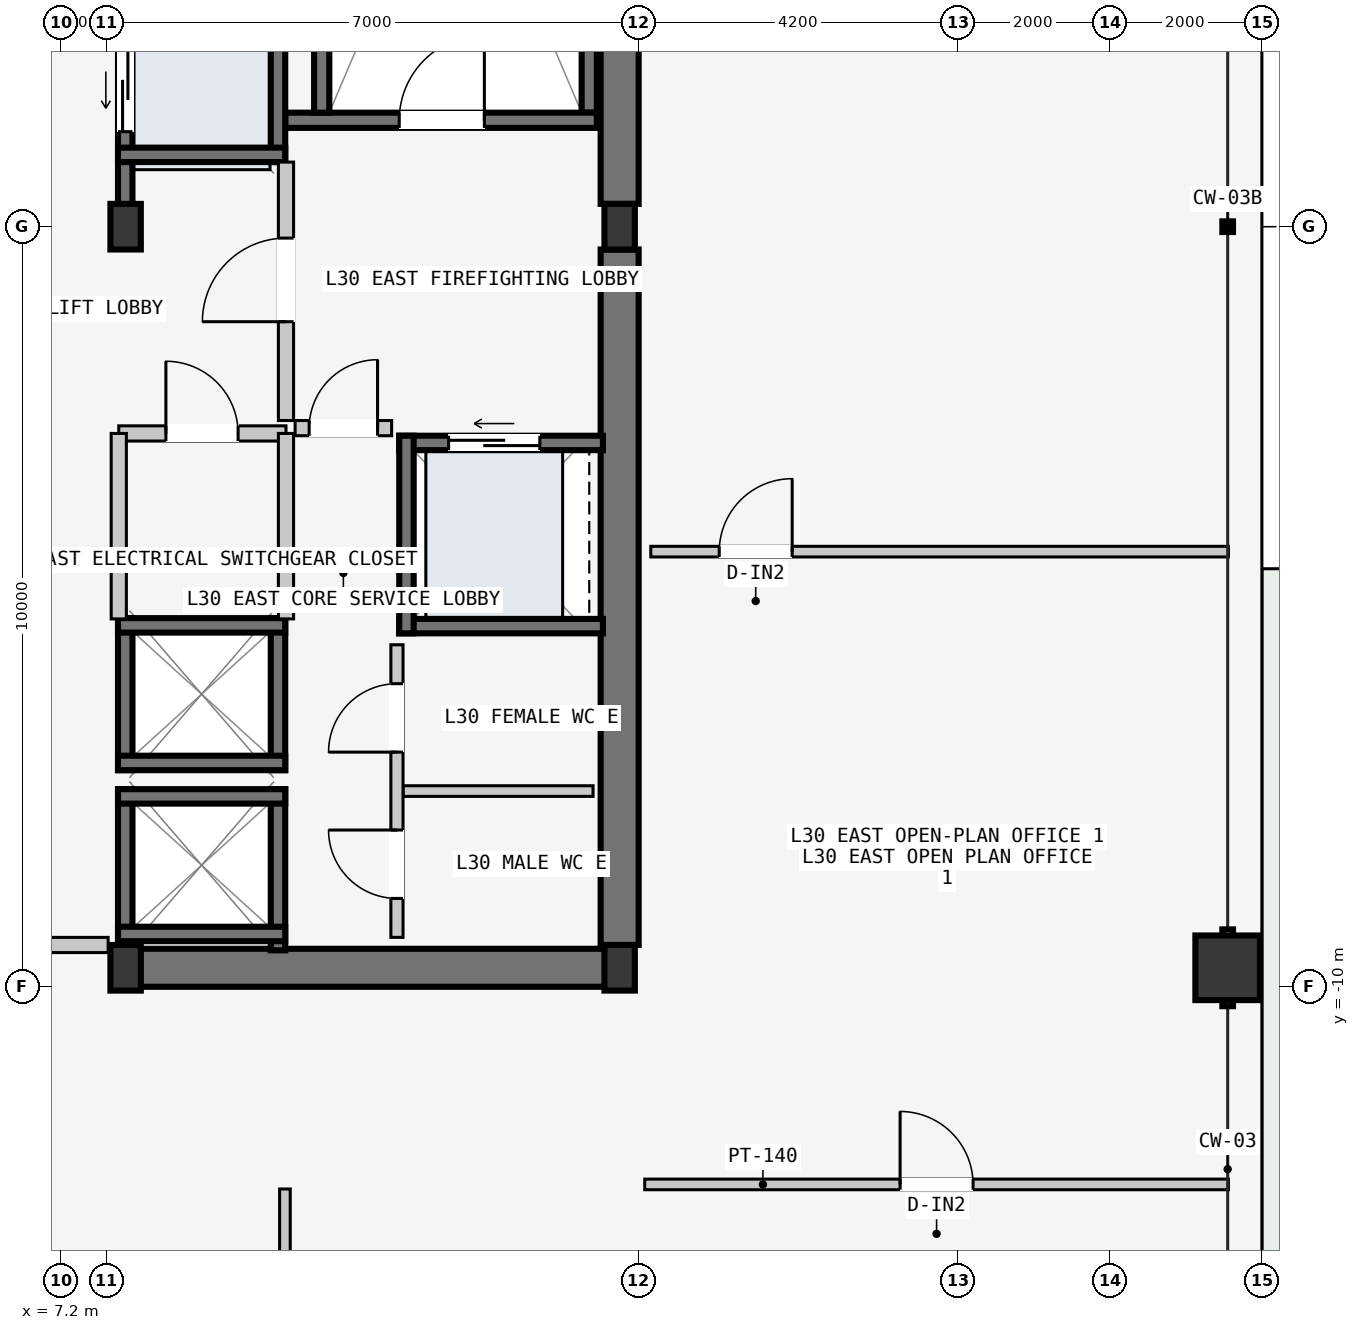
"""IFC4 building model, lengths in metres.
Left out: names, types, materials, properties, quantities, classifications, styles, units other than length and angle.
Written with IfcOpenShell. Run it as: python <this file> out.ifc"""

import sys

from ifc_helpers import new_model, si_unit, direction, frame, frame_2d, origin, origin_2d, place, context, subcontext, project, spatial, rectangle, hollow_rectangle, i_section, extrude, element, fill, save


model = new_model("IFC4")
c1 = context("Model", 3, precision=1e-05, world=origin(), true_north=direction((0.0, 1.0)))
c2 = subcontext(c1, "Body", "Model", "MODEL_VIEW")
j1 = project(units=[si_unit("LENGTHUNIT", "METRE"), si_unit("PLANEANGLEUNIT", "RADIAN")], contexts=[c1])
p1 = place(None, origin())
s1 = spatial("IfcSite", under=j1, at=p1, CompositionType="ELEMENT")
p2 = place(p1, origin())
s2 = spatial("IfcBuilding", under=s1, at=p2, CompositionType="ELEMENT")
p3 = place(p2, frame((0.0, 0.0, 117.0)))
s3 = spatial("IfcBuildingStorey", under=s2, at=p3, CompositionType="ELEMENT", Elevation=117.0)
p4 = place(p3, frame((8.07, -9.75, -0.2), z_axis=(0.0, 0.0, 1.0), x_axis=(1.0, 0.0, 0.0)))
e1 = element("IfcWall", 1, at=p4, inside=s3, PredefinedType="SHEAR", context=c2, shape_type="SweptSolid", body=[
    extrude(rectangle(XDim=6.46, YDim=0.5, at=frame_2d((3.23, 0.0))), origin(), (0.0, 0.0, 1.0), 3.6),
])
for number, where, z_axis, x_axis in (
    (2, (14.55, -9.45, -0.2), (0.0, 0.0, 1.0), (0.0, 1.0, 0.0)),
    (3, (14.55, 0.3, -0.2), (0.0, 0.0, 1.0), (0.0, 1.0, 0.0)),
):
    element("IfcWall", number, at=place(p3, frame(where, z_axis=z_axis, x_axis=x_axis)), inside=s3, PredefinedType="SHEAR", context=c2, shape_type="SweptSolid", body=[
        extrude(rectangle(XDim=9.15, YDim=0.5, at=frame_2d((4.575, 0.0))), origin(), (0.0, 0.0, 1.0), 3.6),
    ])
p5 = place(p3, frame((14.15, 1.5, -0.2), z_axis=(0.0, 0.0, 1.0), x_axis=(0.0, 1.0, 0.0)))
e4 = element("IfcWall", 4, at=p5, inside=s3, PredefinedType="SOLIDWALL", context=c2, shape_type="SweptSolid", body=[
    extrude(rectangle(XDim=7.8, YDim=0.2, at=frame_2d((3.9, 0.0))), origin(), (0.0, 0.0, 1.0), 3.6),
])
p6 = place(p3, frame((10.15, 1.4, -0.2), z_axis=(0.0, 0.0, 1.0), x_axis=(1.0, 0.0, 0.0)))
e5 = element("IfcWall", 5, at=p6, inside=s3, PredefinedType="SOLIDWALL", context=c2, shape_type="SweptSolid", body=[
    extrude(rectangle(XDim=4.1, YDim=0.2, at=frame_2d((2.05, 0.0))), origin(), (0.0, 0.0, 1.0), 3.6),
])
p7 = place(p6, frame((1.5, 0.0, 0.2)))
e6 = element("IfcOpeningElement", 6, at=p7, cuts=e5, PredefinedType="OPENING", context=c2, shape_type="SweptSolid", body=[
    extrude(rectangle(XDim=1.12, YDim=2.18, at=frame_2d((0.56, 1.09))), frame((0.0, 0.11, 0.0), z_axis=(0.0, -1.0, 0.0), x_axis=(1.0, 0.0, 0.0)), (0.0, 0.0, 1.0), 0.22),
])
p8 = place(p3, frame((10.63, 1.5, -0.2), z_axis=(0.0, 0.0, 1.0), x_axis=(0.0, 1.0, 0.0)))
e7 = element("IfcWall", 7, at=p8, inside=s3, PredefinedType="SOLIDWALL", context=c2, shape_type="SweptSolid", body=[
    extrude(rectangle(XDim=7.8, YDim=0.2, at=frame_2d((3.9, 0.0))), origin(), (0.0, 0.0, 1.0), 3.6),
])
for number, where, z_axis, x_axis in (
    (8, (8.05, -9.75, 0.0), (0.0, 0.0, 1.0), (1.0, 0.0, 0.0)),
    (9, (8.05, 0.0, 0.0), (0.0, 0.0, 1.0), (1.0, 0.0, 0.0)),
    (10, (14.55, -9.75, 0.0), (0.0, 0.0, 1.0), (1.0, 0.0, 0.0)),
    (11, (14.55, 0.0, 0.0), (0.0, 0.0, 1.0), (1.0, 0.0, 0.0)),
):
    element("IfcColumn", number, at=place(p3, frame(where, z_axis=z_axis, x_axis=x_axis)), inside=s3, PredefinedType="COLUMN", context=c2, shape_type="SweptSolid", body=[
        extrude(i_section(OverallWidth=0.4, OverallDepth=0.6, WebThickness=0.022, FlangeThickness=0.036, at=origin_2d()), origin(), (0.0, 0.0, 1.0), 3.6),
    ])
p9 = place(p3, frame((22.55, -9.75, 0.0), z_axis=(0.0, 0.0, 1.0), x_axis=(0.0, 1.0, 0.0)))
e12 = element("IfcColumn", 12, at=p9, inside=s3, PredefinedType="COLUMN", context=c2, shape_type="SweptSolid", body=[
    extrude(hollow_rectangle(XDim=0.85, YDim=0.85, WallThickness=0.04, at=origin_2d()), origin(), (0.0, 0.0, 1.0), 3.6),
])
p10 = place(p3, frame((8.045, 0.21, -0.2), z_axis=(0.0, 0.0, 1.0), x_axis=(0.0, 1.0, 0.0)))
e13 = element("IfcWall", 13, at=p10, inside=s3, PredefinedType="SOLIDWALL", context=c2, shape_type="SweptSolid", body=[
    extrude(rectangle(XDim=2.54, YDim=0.19, at=frame_2d((1.27, 0.0))), origin(), (0.0, 0.0, 1.0), 3.6),
])
p11 = place(p10, frame((1.04, 0.0, 0.2)))
e14 = element("IfcOpeningElement", 14, at=p11, cuts=e13, PredefinedType="OPENING", context=c2, shape_type="SweptSolid", body=[
    extrude(rectangle(XDim=1.1, YDim=2.2, at=frame_2d((0.55, 1.1))), frame((0.0, 0.105, 0.0), z_axis=(0.0, -1.0, 0.0), x_axis=(1.0, 0.0, 0.0)), (0.0, 0.0, 1.0), 0.21),
])
p12 = place(p3, frame((10.055, 0.85, -0.2), z_axis=(0.0, 0.0, 1.0), x_axis=(0.0, 1.0, 0.0)))
e15 = element("IfcWall", 15, at=p12, inside=s3, PredefinedType="SOLIDWALL", context=c2, shape_type="SweptSolid", body=[
    extrude(rectangle(XDim=1.9, YDim=0.19, at=frame_2d((0.95, 0.0))), origin(), (0.0, 0.0, 1.0), 3.6),
])
p13 = place(p3, frame((7.95, 0.945, -0.2), z_axis=(0.0, 0.0, 1.0), x_axis=(1.0, 0.0, 0.0)))
e16 = element("IfcWall", 16, at=p13, inside=s3, PredefinedType="SOLIDWALL", context=c2, shape_type="SweptSolid", body=[
    extrude(rectangle(XDim=2.2, YDim=0.19, at=frame_2d((1.1, 0.0))), origin(), (0.0, 0.0, 1.0), 3.6),
])
for number, where, z_axis, x_axis in (
    (17, (8.045, -9.52, -0.2), (0.0, 0.0, 1.0), (0.0, 1.0, 0.0)),
    (18, (10.055, -9.52, -0.2), (0.0, 0.0, 1.0), (0.0, 1.0, 0.0)),
):
    element("IfcWall", number, at=place(p3, frame(where, z_axis=z_axis, x_axis=x_axis)), inside=s3, PredefinedType="SOLIDWALL", context=c2, shape_type="SweptSolid", body=[
        extrude(rectangle(XDim=2.12, YDim=0.19, at=frame_2d((1.06, 0.0))), origin(), (0.0, 0.0, 1.0), 3.6),
    ])
for number, where, z_axis, x_axis in (
    (19, (7.95, -7.495, -0.2), (0.0, 0.0, 1.0), (1.0, 0.0, 0.0)),
    (20, (7.95, -9.305, -0.2), (0.0, 0.0, 1.0), (1.0, 0.0, 0.0)),
):
    element("IfcWall", number, at=place(p3, frame(where, z_axis=z_axis, x_axis=x_axis)), inside=s3, PredefinedType="SOLIDWALL", context=c2, shape_type="SweptSolid", body=[
        extrude(rectangle(XDim=2.2, YDim=0.19, at=frame_2d((1.1, 0.0))), origin(), (0.0, 0.0, 1.0), 3.6),
    ])
for number, where, z_axis, x_axis in (
    (21, (8.045, -7.15, -0.2), (0.0, 0.0, 1.0), (0.0, 1.0, 0.0)),
    (22, (10.055, -7.15, -0.2), (0.0, 0.0, 1.0), (0.0, 1.0, 0.0)),
):
    element("IfcWall", number, at=place(p3, frame(where, z_axis=z_axis, x_axis=x_axis)), inside=s3, PredefinedType="SOLIDWALL", context=c2, shape_type="SweptSolid", body=[
        extrude(rectangle(XDim=2.0, YDim=0.19, at=frame_2d((1.0, 0.0))), origin(), (0.0, 0.0, 1.0), 3.6),
    ])
for number, where, z_axis, x_axis in (
    (23, (7.95, -5.245, -0.2), (0.0, 0.0, 1.0), (1.0, 0.0, 0.0)),
    (24, (7.95, -7.055, -0.2), (0.0, 0.0, 1.0), (1.0, 0.0, 0.0)),
):
    element("IfcWall", number, at=place(p3, frame(where, z_axis=z_axis, x_axis=x_axis)), inside=s3, PredefinedType="SOLIDWALL", context=c2, shape_type="SweptSolid", body=[
        extrude(rectangle(XDim=2.2, YDim=0.19, at=frame_2d((1.1, 0.0))), origin(), (0.0, 0.0, 1.0), 3.6),
    ])
p14 = place(p3, frame((11.65, -2.845, -0.2), z_axis=(0.0, 0.0, 1.0), x_axis=(1.0, 0.0, 0.0)))
e25 = element("IfcWall", 25, at=p14, inside=s3, PredefinedType="SOLIDWALL", context=c2, shape_type="SweptSolid", body=[
    extrude(rectangle(XDim=2.68, YDim=0.19, at=frame_2d((1.34, 0.0))), origin(), (0.0, 0.0, 1.0), 3.6),
])
p15 = place(p14, frame((0.65, 0.0, 0.2)))
e26 = element("IfcOpeningElement", 26, at=p15, cuts=e25, PredefinedType="OPENING", context=c2, shape_type="SweptSolid", body=[
    extrude(rectangle(XDim=1.2, YDim=2.2, at=frame_2d((0.6, 1.1))), frame((0.0, 0.105, 0.0), z_axis=(0.0, -1.0, 0.0), x_axis=(1.0, 0.0, 0.0)), (0.0, 0.0, 1.0), 0.21),
])
p16 = place(p3, frame((11.65, -5.255, -0.2), z_axis=(0.0, 0.0, 1.0), x_axis=(1.0, 0.0, 0.0)))
e27 = element("IfcWall", 27, at=p16, inside=s3, PredefinedType="SOLIDWALL", context=c2, shape_type="SweptSolid", body=[
    extrude(rectangle(XDim=2.68, YDim=0.19, at=frame_2d((1.34, 0.0))), origin(), (0.0, 0.0, 1.0), 3.6),
])
p17 = place(p3, frame((11.745, -5.35, -0.2), z_axis=(0.0, 0.0, 1.0), x_axis=(0.0, 1.0, 0.0)))
e28 = element("IfcWall", 28, at=p17, inside=s3, PredefinedType="SOLIDWALL", context=c2, shape_type="SweptSolid", body=[
    extrude(rectangle(XDim=2.6, YDim=0.19, at=frame_2d((1.3, 0.0))), origin(), (0.0, 0.0, 1.0), 3.6),
])
p18 = place(p3, frame((6.02, -9.45, 0.0), z_axis=(0.0, 0.0, 1.0), x_axis=(1.0, 0.0, 0.0)))
e29 = element("IfcWall", 29, at=p18, inside=s3, PredefinedType="PARTITIONING", context=c2, shape_type="SweptSolid", body=[
    extrude(rectangle(XDim=1.8, YDim=0.2, at=frame_2d((0.9, 0.0))), origin(), (0.0, 0.0, 1.0), 3.4),
])
p19 = place(p3, frame((10.16, -2.55, 0.0), z_axis=(0.0, 0.0, 1.0), x_axis=(0.0, 1.0, 0.0)))
e30 = element("IfcWall", 30, at=p19, inside=s3, PredefinedType="PARTITIONING", context=c2, shape_type="SweptSolid", body=[
    extrude(rectangle(XDim=3.4, YDim=0.2, at=frame_2d((1.7, 0.0))), origin(), (0.0, 0.0, 1.0), 3.4),
])
p20 = place(p19, frame((1.3, 0.0, 0.0)))
e31 = element("IfcOpeningElement", 31, at=p20, cuts=e30, PredefinedType="OPENING", context=c2, shape_type="SweptSolid", body=[
    extrude(rectangle(XDim=1.1, YDim=2.15, at=frame_2d((0.55, 1.075))), frame((0.0, 0.11, 0.0), z_axis=(0.0, -1.0, 0.0), x_axis=(1.0, 0.0, 0.0)), (0.0, 0.0, 1.0), 0.22),
])
p21 = place(p3, frame((10.28, -2.65, 0.0), z_axis=(0.0, 0.0, 1.0), x_axis=(1.0, 0.0, 0.0)))
e32 = element("IfcWall", 32, at=p21, inside=s3, PredefinedType="PARTITIONING", context=c2, shape_type="SweptSolid", body=[
    extrude(rectangle(XDim=1.27, YDim=0.2, at=frame_2d((0.635, 0.0))), origin(), (0.0, 0.0, 1.0), 3.4),
])
p22 = place(p21, frame((0.185, 0.0, 0.0)))
e33 = element("IfcOpeningElement", 33, at=p22, cuts=e32, PredefinedType="OPENING", context=c2, shape_type="SweptSolid", body=[
    extrude(rectangle(XDim=0.9, YDim=2.15, at=frame_2d((0.45, 1.075))), frame((0.0, 0.11, 0.0), z_axis=(0.0, -1.0, 0.0), x_axis=(1.0, 0.0, 0.0)), (0.0, 0.0, 1.0), 0.22),
])
p23 = place(p3, frame((7.96, -2.72, 0.0), z_axis=(0.0, 0.0, 1.0), x_axis=(1.0, 0.0, 0.0)))
e34 = element("IfcWall", 34, at=p23, inside=s3, PredefinedType="PARTITIONING", context=c2, shape_type="SweptSolid", body=[
    extrude(rectangle(XDim=2.2, YDim=0.2, at=frame_2d((1.1, 0.0))), origin(), (0.0, 0.0, 1.0), 3.4),
])
p24 = place(p23, frame((0.62, 0.0, 0.0)))
e35 = element("IfcOpeningElement", 35, at=p24, cuts=e34, PredefinedType="OPENING", context=c2, shape_type="SweptSolid", body=[
    extrude(rectangle(XDim=0.95, YDim=2.1, at=frame_2d((0.475, 1.05))), frame((0.0, 0.11, 0.0), z_axis=(0.0, -1.0, 0.0), x_axis=(1.0, 0.0, 0.0)), (0.0, 0.0, 1.0), 0.22),
])
for number, where, z_axis, x_axis in (
    (36, (7.96, -5.16, 0.0), (0.0, 0.0, 1.0), (0.0, 1.0, 0.0)),
    (37, (10.16, -5.16, 0.0), (0.0, 0.0, 1.0), (0.0, 1.0, 0.0)),
):
    element("IfcWall", number, at=place(p3, frame(where, z_axis=z_axis, x_axis=x_axis)), inside=s3, PredefinedType="PARTITIONING", context=c2, shape_type="SweptSolid", body=[
        extrude(rectangle(XDim=2.44, YDim=0.2, at=frame_2d((1.22, 0.0))), origin(), (0.0, 0.0, 1.0), 3.4),
    ])
p25 = place(p3, frame((11.7, -7.425, 0.0), z_axis=(0.0, 0.0, 1.0), x_axis=(1.0, 0.0, 0.0)))
e38 = element("IfcWall", 38, at=p25, inside=s3, PredefinedType="PARTITIONING", context=c2, shape_type="SweptSolid", body=[
    extrude(rectangle(XDim=2.5, YDim=0.14, at=frame_2d((1.25, 0.0))), origin(), (0.0, 0.0, 1.0), 3.4),
])
p26 = place(p3, frame((11.62, -9.35, 0.0), z_axis=(0.0, 0.0, 1.0), x_axis=(0.0, 1.0, 0.0)))
e39 = element("IfcWall", 39, at=p26, inside=s3, PredefinedType="PARTITIONING", context=c2, shape_type="SweptSolid", body=[
    extrude(rectangle(XDim=3.85, YDim=0.16, at=frame_2d((1.925, 0.0))), origin(), (0.0, 0.0, 1.0), 3.4),
])
p27 = place(p26, frame((0.512, 0.0, 0.0)))
e40 = element("IfcOpeningElement", 40, at=p27, cuts=e39, PredefinedType="OPENING", context=c2, shape_type="SweptSolid", body=[
    extrude(rectangle(XDim=0.9, YDim=2.15, at=frame_2d((0.45, 1.075))), frame((0.0, 0.09, 0.0), z_axis=(0.0, -1.0, 0.0), x_axis=(1.0, 0.0, 0.0)), (0.0, 0.0, 1.0), 0.18),
])
p28 = place(p26, frame((2.438, 0.0, 0.0)))
e41 = element("IfcOpeningElement", 41, at=p28, cuts=e39, PredefinedType="OPENING", context=c2, shape_type="SweptSolid", body=[
    extrude(rectangle(XDim=0.9, YDim=2.15, at=frame_2d((0.45, 1.075))), frame((0.0, 0.09, 0.0), z_axis=(0.0, -1.0, 0.0), x_axis=(1.0, 0.0, 0.0)), (0.0, 0.0, 1.0), 0.18),
])
p29 = place(p3, frame((10.146, -19.56, 0.0), z_axis=(0.0, 0.0, 1.0), x_axis=(0.0, 1.0, 0.0)))
e42 = element("IfcWall", 42, at=p29, inside=s3, PredefinedType="PARTITIONING", context=c2, shape_type="SweptSolid", body=[
    extrude(rectangle(XDim=6.9, YDim=0.14, at=frame_2d((3.45, 0.0))), origin(), (0.0, 0.0, 1.0), 3.4),
])
p30 = place(p29, frame((1.05, 0.0, 0.0)))
e43 = element("IfcOpeningElement", 43, at=p30, cuts=e42, PredefinedType="OPENING", context=c2, shape_type="SweptSolid", body=[
    extrude(rectangle(XDim=0.96, YDim=2.18, at=frame_2d((0.48, 1.09))), frame((0.0, 0.08, 0.0), z_axis=(0.0, -1.0, 0.0), x_axis=(1.0, 0.0, 0.0)), (0.0, 0.0, 1.0), 0.16),
])
p31 = place(p3, frame((14.88, -12.6, 0.0), z_axis=(0.0, 0.0, 1.0), x_axis=(1.0, 0.0, 0.0)))
e44 = element("IfcWall", 44, at=p31, inside=s3, PredefinedType="PARTITIONING", context=c2, shape_type="SweptSolid", body=[
    extrude(rectangle(XDim=7.68, YDim=0.14, at=frame_2d((3.84, 0.0))), origin(), (0.0, 0.0, 1.0), 3.4),
])
p32 = place(p31, frame((3.36, 0.0, 0.0)))
e45 = element("IfcOpeningElement", 45, at=p32, cuts=e44, PredefinedType="OPENING", context=c2, shape_type="SweptSolid", body=[
    extrude(rectangle(XDim=0.96, YDim=2.18, at=frame_2d((0.48, 1.09))), frame((0.0, 0.08, 0.0), z_axis=(0.0, -1.0, 0.0), x_axis=(1.0, 0.0, 0.0)), (0.0, 0.0, 1.0), 0.16),
])
p33 = place(p3, frame((14.96, -4.275, 0.0), z_axis=(0.0, 0.0, 1.0), x_axis=(1.0, 0.0, 0.0)))
e46 = element("IfcWall", 46, at=p33, inside=s3, PredefinedType="PARTITIONING", context=c2, shape_type="SweptSolid", body=[
    extrude(rectangle(XDim=7.6, YDim=0.14, at=frame_2d((3.8, 0.0))), origin(), (0.0, 0.0, 1.0), 3.4),
])
p34 = place(p33, frame((0.9, 0.0, 0.0)))
e47 = element("IfcOpeningElement", 47, at=p34, cuts=e46, PredefinedType="OPENING", context=c2, shape_type="SweptSolid", body=[
    extrude(rectangle(XDim=0.96, YDim=2.18, at=frame_2d((0.48, 1.09))), frame((0.0, 0.08, 0.0), z_axis=(0.0, -1.0, 0.0), x_axis=(1.0, 0.0, 0.0)), (0.0, 0.0, 1.0), 0.16),
])
p35 = place(p7, origin())
e48 = element("IfcDoor", 48, at=p35, inside=s3, OperationType="SINGLE_SWING_RIGHT", PredefinedType="DOOR", context=c2, shape_type="SweptSolid", body=[
    extrude(rectangle(XDim=1.12, YDim=2.18, at=frame_2d((0.56, 1.09))), frame((0.0, 0.025, 0.0), z_axis=(0.0, -1.0, 0.0), x_axis=(1.0, 0.0, 0.0)), (0.0, 0.0, 1.0), 0.05),
])
fill(e6, e48)
p36 = place(p11, origin())
e49 = element("IfcDoor", 49, at=p36, inside=s3, OperationType="SLIDING_TO_LEFT", PredefinedType="DOOR", context=c2, shape_type="SweptSolid", body=[
    extrude(rectangle(XDim=1.1, YDim=2.2, at=frame_2d((0.55, 1.1))), frame((0.0, 0.025, 0.0), z_axis=(0.0, -1.0, 0.0), x_axis=(1.0, 0.0, 0.0)), (0.0, 0.0, 1.0), 0.05),
])
fill(e14, e49)
p37 = place(p15, origin())
e50 = element("IfcDoor", 50, at=p37, inside=s3, OperationType="SLIDING_TO_LEFT", PredefinedType="DOOR", context=c2, shape_type="SweptSolid", body=[
    extrude(rectangle(XDim=1.2, YDim=2.2, at=frame_2d((0.6, 1.1))), frame((0.0, 0.025, 0.0), z_axis=(0.0, -1.0, 0.0), x_axis=(1.0, 0.0, 0.0)), (0.0, 0.0, 1.0), 0.05),
])
fill(e26, e50)
p38 = place(p20, origin())
e51 = element("IfcDoor", 51, at=p38, inside=s3, OperationType="SINGLE_SWING_LEFT", PredefinedType="DOOR", context=c2, shape_type="SweptSolid", body=[
    extrude(rectangle(XDim=1.1, YDim=2.15, at=frame_2d((0.55, 1.075))), frame((0.0, 0.025, 0.0), z_axis=(0.0, -1.0, 0.0), x_axis=(1.0, 0.0, 0.0)), (0.0, 0.0, 1.0), 0.05),
])
fill(e31, e51)
p39 = place(p22, origin())
e52 = element("IfcDoor", 52, at=p39, inside=s3, OperationType="SINGLE_SWING_RIGHT", PredefinedType="DOOR", context=c2, shape_type="SweptSolid", body=[
    extrude(rectangle(XDim=0.9, YDim=2.15, at=frame_2d((0.45, 1.075))), frame((0.0, 0.025, 0.0), z_axis=(0.0, -1.0, 0.0), x_axis=(1.0, 0.0, 0.0)), (0.0, 0.0, 1.0), 0.05),
])
fill(e33, e52)
p40 = place(p24, origin())
e53 = element("IfcDoor", 53, at=p40, inside=s3, OperationType="SINGLE_SWING_LEFT", PredefinedType="DOOR", context=c2, shape_type="SweptSolid", body=[
    extrude(rectangle(XDim=0.95, YDim=2.1, at=frame_2d((0.475, 1.05))), frame((0.0, 0.025, 0.0), z_axis=(0.0, -1.0, 0.0), x_axis=(1.0, 0.0, 0.0)), (0.0, 0.0, 1.0), 0.05),
])
fill(e35, e53)
p41 = place(p27, origin())
e54 = element("IfcDoor", 54, at=p41, inside=s3, OperationType="SINGLE_SWING_RIGHT", PredefinedType="DOOR", context=c2, shape_type="SweptSolid", body=[
    extrude(rectangle(XDim=0.9, YDim=2.15, at=frame_2d((0.45, 1.075))), frame((0.0, 0.025, 0.0), z_axis=(0.0, -1.0, 0.0), x_axis=(1.0, 0.0, 0.0)), (0.0, 0.0, 1.0), 0.05),
])
fill(e40, e54)
p42 = place(p28, origin())
e55 = element("IfcDoor", 55, at=p42, inside=s3, OperationType="SINGLE_SWING_LEFT", PredefinedType="DOOR", context=c2, shape_type="SweptSolid", body=[
    extrude(rectangle(XDim=0.9, YDim=2.15, at=frame_2d((0.45, 1.075))), frame((0.0, 0.025, 0.0), z_axis=(0.0, -1.0, 0.0), x_axis=(1.0, 0.0, 0.0)), (0.0, 0.0, 1.0), 0.05),
])
fill(e41, e55)
p43 = place(p32, origin())
e56 = element("IfcDoor", 56, at=p43, inside=s3, OperationType="SINGLE_SWING_LEFT", PredefinedType="DOOR", context=c2, shape_type="SweptSolid", body=[
    extrude(rectangle(XDim=0.96, YDim=2.18, at=frame_2d((0.48, 1.09))), frame((0.0, 0.025, 0.0), z_axis=(0.0, -1.0, 0.0), x_axis=(1.0, 0.0, 0.0)), (0.0, 0.0, 1.0), 0.05),
])
fill(e45, e56)
p44 = place(p34, origin())
e57 = element("IfcDoor", 57, at=p44, inside=s3, OperationType="SINGLE_SWING_RIGHT", PredefinedType="DOOR", context=c2, shape_type="SweptSolid", body=[
    extrude(rectangle(XDim=0.96, YDim=2.18, at=frame_2d((0.48, 1.09))), frame((0.0, 0.025, 0.0), z_axis=(0.0, -1.0, 0.0), x_axis=(1.0, 0.0, 0.0)), (0.0, 0.0, 1.0), 0.05),
])
fill(e47, e57)
save(model, sys.argv[1])
